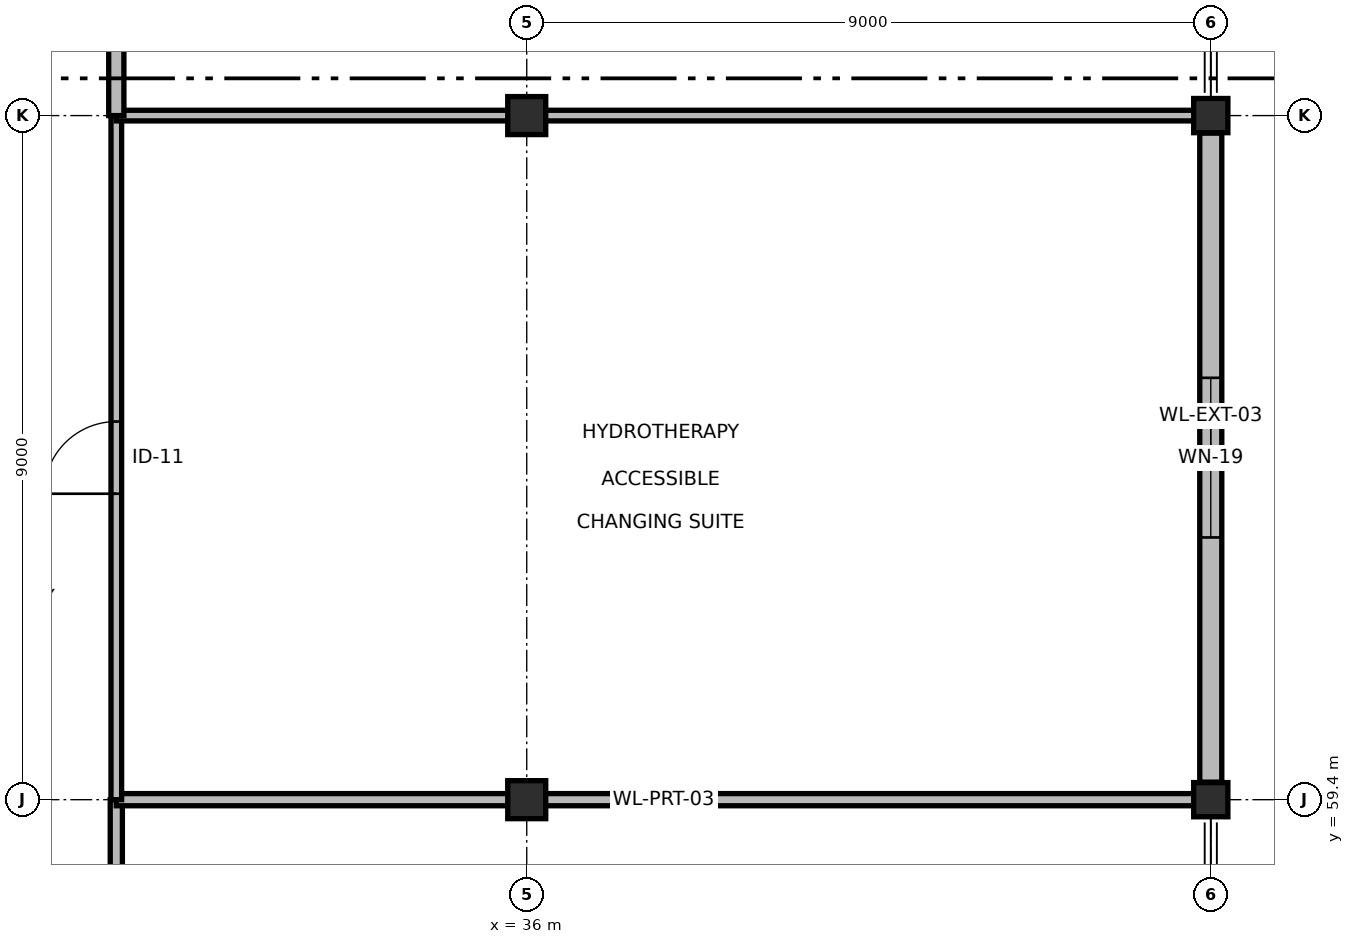
"""IFC4 building model, lengths in metres.
Left out: names, types, materials, properties, quantities, classifications, styles, units other than length and angle.
Written with IfcOpenShell. Run it as: python <this file> out.ifc"""

import sys

from ifc_helpers import new_model, si_unit, direction, frame, frame_2d, origin, origin_2d, place, context, subcontext, project, spatial, rectangle, extrude, element, fill, save


model = new_model("IFC4")
c1 = context("Model", 3, precision=1e-05, world=origin(), true_north=direction((0.0, 1.0)))
c2 = subcontext(c1, "Body", "Model", "MODEL_VIEW")
j1 = project(units=[si_unit("LENGTHUNIT", "METRE"), si_unit("PLANEANGLEUNIT", "RADIAN")], contexts=[c1])
p1 = place(None, origin())
s1 = spatial("IfcSite", under=j1, at=p1, CompositionType="ELEMENT")
p2 = place(p1, origin())
s2 = spatial("IfcBuilding", under=s1, at=p2, CompositionType="ELEMENT")
p3 = place(p2, frame((0.0, 0.0, 4.8)))
s3 = spatial("IfcBuildingStorey", under=s2, at=p3, CompositionType="ELEMENT", Elevation=4.8)
for number, where, z_axis, x_axis in (
    (1, (36.0, 59.4, 0.0), (0.0, 0.0, 1.0), (1.0, 0.0, 0.0)),
    (2, (36.0, 68.4, 0.0), (0.0, 0.0, 1.0), (1.0, 0.0, 0.0)),
):
    element("IfcColumn", number, at=place(p3, frame(where, z_axis=z_axis, x_axis=x_axis)), inside=s3, PredefinedType="COLUMN", context=c2, shape_type="SweptSolid", body=[
        extrude(rectangle(XDim=0.5, YDim=0.5, at=origin_2d()), origin(), (0.0, 0.0, 1.0), 4.8),
    ])
for number, where, z_axis, x_axis in (
    (3, (45.0, 59.4, 0.0), (0.0, 0.0, 1.0), (1.0, 0.0, 0.0)),
    (4, (45.0, 68.4, 0.0), (0.0, 0.0, 1.0), (1.0, 0.0, 0.0)),
):
    element("IfcColumn", number, at=place(p3, frame(where, z_axis=z_axis, x_axis=x_axis)), inside=s3, PredefinedType="COLUMN", context=c2, shape_type="SweptSolid", body=[
        extrude(rectangle(XDim=0.45, YDim=0.45, at=origin_2d()), origin(), (0.0, 0.0, 1.0), 4.8),
    ])
p4 = place(p3, frame((45.0, 68.17, 0.0), z_axis=(0.0, 0.0, 1.0), x_axis=(0.0, -1.0, 0.0)))
e5 = element("IfcWall", 5, at=p4, inside=s3, PredefinedType="SOLIDWALL", context=c2, shape_type="SweptSolid", body=[
    extrude(rectangle(XDim=8.54, YDim=0.29, at=frame_2d((4.27, 0.0))), origin(), (0.0, 0.0, 1.0), 3.825),
])
p5 = place(p4, frame((3.22, 0.0, 0.85)))
e6 = element("IfcOpeningElement", 6, at=p5, cuts=e5, PredefinedType="OPENING", context=c2, shape_type="SweptSolid", body=[
    extrude(rectangle(XDim=2.1, YDim=1.8, at=frame_2d((1.05, 0.9))), frame((0.0, 0.155, 0.0), z_axis=(0.0, -1.0, 0.0), x_axis=(1.0, 0.0, 0.0)), (0.0, 0.0, 1.0), 0.31),
])
p6 = place(p3, frame((30.6, 40.8, 0.0), z_axis=(0.0, 0.0, 1.0), x_axis=(0.0, 1.0, 0.0)))
e7 = element("IfcWall", 7, at=p6, inside=s3, PredefinedType="PARTITIONING", context=c2, shape_type="SweptSolid", body=[
    extrude(rectangle(XDim=18.6, YDim=0.16, at=frame_2d((9.3, 0.0))), origin(), (0.0, 0.0, 1.0), 3.875),
])
p7 = place(p6, frame((12.892, 0.0, 0.0)))
e8 = element("IfcOpeningElement", 8, at=p7, cuts=e7, PredefinedType="OPENING", context=c2, shape_type="SweptSolid", body=[
    extrude(rectangle(XDim=1.0, YDim=2.1, at=frame_2d((0.5, 1.05))), frame((0.0, 0.09, 0.0), z_axis=(0.0, -1.0, 0.0), x_axis=(1.0, 0.0, 0.0)), (0.0, 0.0, 1.0), 0.18),
])
p8 = place(p3, frame((30.6, 59.4, 0.0), z_axis=(0.0, 0.0, 1.0), x_axis=(1.0, 0.0, 0.0)))
e9 = element("IfcWall", 9, at=p8, inside=s3, PredefinedType="PARTITIONING", context=c2, shape_type="SweptSolid", body=[
    extrude(rectangle(XDim=14.4, YDim=0.16, at=frame_2d((7.2, 0.0))), origin(), (0.0, 0.0, 1.0), 3.775),
])
p9 = place(p3, frame((30.6, 59.4, 0.0), z_axis=(0.0, 0.0, 1.0), x_axis=(0.0, 1.0, 0.0)))
e10 = element("IfcWall", 10, at=p9, inside=s3, PredefinedType="PARTITIONING", context=c2, shape_type="SweptSolid", body=[
    extrude(rectangle(XDim=9.0, YDim=0.14, at=frame_2d((4.5, 0.0))), origin(), (0.0, 0.0, 1.0), 3.875),
])
p10 = place(p9, frame((4.025, 0.0, 0.0)))
e11 = element("IfcOpeningElement", 11, at=p10, cuts=e10, PredefinedType="OPENING", context=c2, shape_type="SweptSolid", body=[
    extrude(rectangle(XDim=0.95, YDim=2.1, at=frame_2d((0.475, 1.05))), frame((0.0, 0.08, 0.0), z_axis=(0.0, -1.0, 0.0), x_axis=(1.0, 0.0, 0.0)), (0.0, 0.0, 1.0), 0.16),
])
p11 = place(p3, frame((30.6, 68.4, 0.0), z_axis=(0.0, 0.0, 1.0), x_axis=(1.0, 0.0, 0.0)))
e12 = element("IfcWall", 12, at=p11, inside=s3, PredefinedType="PARTITIONING", context=c2, shape_type="SweptSolid", body=[
    extrude(rectangle(XDim=14.4, YDim=0.14, at=frame_2d((7.2, 0.0))), origin(), (0.0, 0.0, 1.0), 3.825),
])
p12 = place(p3, frame((30.6, 68.4, 0.0), z_axis=(0.0, 0.0, 1.0), x_axis=(0.0, 1.0, 0.0)))
e13 = element("IfcWall", 13, at=p12, inside=s3, PredefinedType="PARTITIONING", context=c2, shape_type="SweptSolid", body=[
    extrude(rectangle(XDim=28.8, YDim=0.2, at=frame_2d((14.4, 0.0))), origin(), (0.0, 0.0, 1.0), 3.875),
])
p13 = place(p12, frame((21.889, 0.0, 0.0)))
e14 = element("IfcOpeningElement", 14, at=p13, cuts=e13, PredefinedType="OPENING", context=c2, shape_type="SweptSolid", body=[
    extrude(rectangle(XDim=1.15, YDim=2.2, at=frame_2d((0.575, 1.1))), frame((0.0, 0.11, 0.0), z_axis=(0.0, -1.0, 0.0), x_axis=(1.0, 0.0, 0.0)), (0.0, 0.0, 1.0), 0.22),
])
p14 = place(p5, origin())
e15 = element("IfcWindow", 15, at=p14, inside=s3, PartitioningType="SINGLE_PANEL", PredefinedType="WINDOW", context=c2, shape_type="SweptSolid", body=[
    extrude(rectangle(XDim=2.1, YDim=1.8, at=frame_2d((1.05, 0.9))), frame((0.0, 0.03, 0.0), z_axis=(0.0, -1.0, 0.0), x_axis=(1.0, 0.0, 0.0)), (0.0, 0.0, 1.0), 0.06),
])
fill(e6, e15)
p15 = place(p10, origin())
e16 = element("IfcDoor", 16, at=p15, inside=s3, OperationType="SINGLE_SWING_LEFT", PredefinedType="DOOR", context=c2, shape_type="SweptSolid", body=[
    extrude(rectangle(XDim=0.95, YDim=2.1, at=frame_2d((0.475, 1.05))), frame((0.0, 0.025, 0.0), z_axis=(0.0, -1.0, 0.0), x_axis=(1.0, 0.0, 0.0)), (0.0, 0.0, 1.0), 0.05),
])
fill(e11, e16)
save(model, sys.argv[1])
